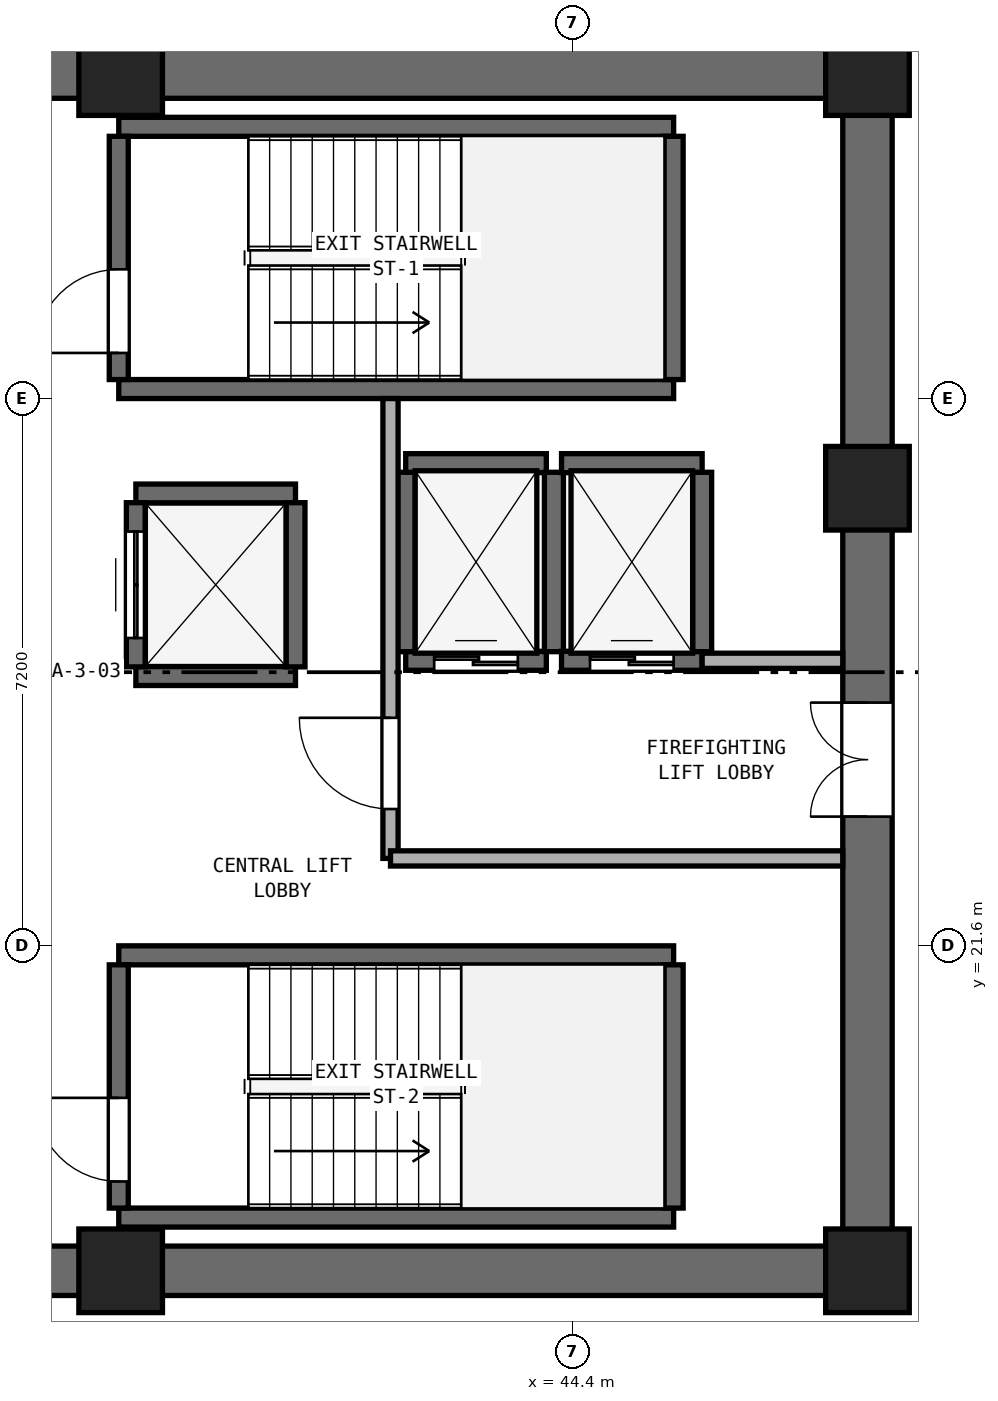
"""IFC4 building model, lengths in metres.
Left out: names, types, materials, properties, quantities, classifications, styles, units other than length and angle.
Written with IfcOpenShell. Run it as: python <this file> out.ifc"""

import sys

from ifc_helpers import new_model, si_unit, direction, frame, frame_2d, origin, origin_2d, place, context, subcontext, project, spatial, rectangle, extrude, element, fill, save


model = new_model("IFC4")
c1 = context("Model", 3, precision=1e-05, world=origin(), true_north=direction((0.0, 1.0)))
c2 = subcontext(c1, "Body", "Model", "MODEL_VIEW")
j1 = project(units=[si_unit("LENGTHUNIT", "METRE"), si_unit("PLANEANGLEUNIT", "RADIAN")], contexts=[c1])
p1 = place(None, origin())
s1 = spatial("IfcSite", under=j1, at=p1, CompositionType="ELEMENT")
p2 = place(p1, origin())
s2 = spatial("IfcBuilding", under=s1, at=p2, CompositionType="ELEMENT")
p3 = place(p2, frame((0.0, 0.0, 89.6)))
s3 = spatial("IfcBuildingStorey", under=s2, at=p3, CompositionType="ELEMENT", Elevation=89.6)
for number, where, z_axis, x_axis in (
    (1, (25.4, 17.325, 0.0), (0.0, 0.0, 1.0), (1.0, 0.0, 0.0)),
    (2, (25.4, 33.075, 0.0), (0.0, 0.0, 1.0), (1.0, 0.0, 0.0)),
):
    element("IfcWall", number, at=place(p3, frame(where, z_axis=z_axis, x_axis=x_axis)), inside=s3, PredefinedType="SHEAR", context=c2, shape_type="SweptSolid", body=[
        extrude(rectangle(XDim=23.2, YDim=0.65, at=frame_2d((11.6, 0.0))), origin(), (0.0, 0.0, 1.0), 3.525),
    ])
p4 = place(p3, frame((48.275, 17.65, 0.0), z_axis=(0.0, 0.0, 1.0), x_axis=(0.0, 1.0, 0.0)))
e3 = element("IfcWall", 3, at=p4, inside=s3, PredefinedType="SHEAR", context=c2, shape_type="SweptSolid", body=[
    extrude(rectangle(XDim=15.1, YDim=0.65, at=frame_2d((7.55, 0.0))), origin(), (0.0, 0.0, 1.0), 3.525),
])
p5 = place(p4, frame((5.65, 0.0, 0.0)))
e4 = element("IfcOpeningElement", 4, at=p5, cuts=e3, PredefinedType="OPENING", context=c2, shape_type="SweptSolid", body=[
    extrude(rectangle(XDim=1.5, YDim=2.15, at=frame_2d((0.75, 1.075))), frame((0.0, 0.335, 0.0), z_axis=(0.0, -1.0, 0.0), x_axis=(1.0, 0.0, 0.0)), (0.0, 0.0, 1.0), 0.67),
])
for number, where, z_axis, x_axis in (
    (5, (38.45, 17.325, 0.0), (0.0, 0.0, 1.0), (1.0, 0.0, 0.0)),
    (6, (48.275, 17.325, 0.0), (0.0, 0.0, 1.0), (1.0, 0.0, 0.0)),
    (7, (48.275, 27.62, 0.0), (0.0, 0.0, 1.0), (1.0, 0.0, 0.0)),
    (8, (48.275, 33.075, 0.0), (0.0, 0.0, 1.0), (1.0, 0.0, 0.0)),
    (9, (38.45, 33.075, 0.0), (0.0, 0.0, 1.0), (1.0, 0.0, 0.0)),
):
    element("IfcColumn", number, at=place(p3, frame(where, z_axis=z_axis, x_axis=x_axis)), inside=s3, PredefinedType="PILASTER", context=c2, shape_type="SweptSolid", body=[
        extrude(rectangle(XDim=1.1, YDim=1.1, at=origin_2d()), origin(), (0.0, 0.0, 1.0), 3.8),
    ])
for number, where, z_axis, x_axis in (
    (10, (38.425, 28.925, 0.0), (0.0, 0.0, 1.0), (1.0, 0.0, 0.0)),
    (11, (38.425, 32.375, 0.0), (0.0, 0.0, 1.0), (1.0, 0.0, 0.0)),
):
    element("IfcWall", number, at=place(p3, frame(where, z_axis=z_axis, x_axis=x_axis)), inside=s3, PredefinedType="SHEAR", context=c2, shape_type="SweptSolid", body=[
        extrude(rectangle(XDim=7.3, YDim=0.25, at=frame_2d((3.65, 0.0))), origin(), (0.0, 0.0, 1.0), 3.525),
    ])
p6 = place(p3, frame((38.425, 29.05, 0.0), z_axis=(0.0, 0.0, 1.0), x_axis=(0.0, 1.0, 0.0)))
e12 = element("IfcWall", 12, at=p6, inside=s3, PredefinedType="SHEAR", context=c2, shape_type="SweptSolid", body=[
    extrude(rectangle(XDim=3.2, YDim=0.25, at=frame_2d((1.6, 0.0))), origin(), (0.0, 0.0, 1.0), 3.525),
])
p7 = place(p6, frame((0.35, 0.0, 0.0)))
e13 = element("IfcOpeningElement", 13, at=p7, cuts=e12, PredefinedType="OPENING", context=c2, shape_type="SweptSolid", body=[
    extrude(rectangle(XDim=1.1, YDim=2.15, at=frame_2d((0.55, 1.075))), frame((0.0, 0.135, 0.0), z_axis=(0.0, -1.0, 0.0), x_axis=(1.0, 0.0, 0.0)), (0.0, 0.0, 1.0), 0.27),
])
p8 = place(p3, frame((45.725, 29.05, 0.0), z_axis=(0.0, 0.0, 1.0), x_axis=(0.0, 1.0, 0.0)))
e14 = element("IfcWall", 14, at=p8, inside=s3, PredefinedType="SHEAR", context=c2, shape_type="SweptSolid", body=[
    extrude(rectangle(XDim=3.2, YDim=0.25, at=frame_2d((1.6, 0.0))), origin(), (0.0, 0.0, 1.0), 3.525),
])
for number, where, z_axis, x_axis in (
    (15, (38.425, 18.025, 0.0), (0.0, 0.0, 1.0), (1.0, 0.0, 0.0)),
    (16, (38.425, 21.475, 0.0), (0.0, 0.0, 1.0), (1.0, 0.0, 0.0)),
):
    element("IfcWall", number, at=place(p3, frame(where, z_axis=z_axis, x_axis=x_axis)), inside=s3, PredefinedType="SHEAR", context=c2, shape_type="SweptSolid", body=[
        extrude(rectangle(XDim=7.3, YDim=0.25, at=frame_2d((3.65, 0.0))), origin(), (0.0, 0.0, 1.0), 3.525),
    ])
p9 = place(p3, frame((38.425, 18.15, 0.0), z_axis=(0.0, 0.0, 1.0), x_axis=(0.0, 1.0, 0.0)))
e17 = element("IfcWall", 17, at=p9, inside=s3, PredefinedType="SHEAR", context=c2, shape_type="SweptSolid", body=[
    extrude(rectangle(XDim=3.2, YDim=0.25, at=frame_2d((1.6, 0.0))), origin(), (0.0, 0.0, 1.0), 3.525),
])
p10 = place(p9, frame((0.35, 0.0, 0.0)))
e18 = element("IfcOpeningElement", 18, at=p10, cuts=e17, PredefinedType="OPENING", context=c2, shape_type="SweptSolid", body=[
    extrude(rectangle(XDim=1.1, YDim=2.15, at=frame_2d((0.55, 1.075))), frame((0.0, 0.135, 0.0), z_axis=(0.0, -1.0, 0.0), x_axis=(1.0, 0.0, 0.0)), (0.0, 0.0, 1.0), 0.27),
])
p11 = place(p3, frame((45.725, 18.15, 0.0), z_axis=(0.0, 0.0, 1.0), x_axis=(0.0, 1.0, 0.0)))
e19 = element("IfcWall", 19, at=p11, inside=s3, PredefinedType="SHEAR", context=c2, shape_type="SweptSolid", body=[
    extrude(rectangle(XDim=3.2, YDim=0.25, at=frame_2d((1.6, 0.0))), origin(), (0.0, 0.0, 1.0), 3.525),
])
p12 = place(p3, frame((42.2, 25.35, 0.0), z_axis=(0.0, 0.0, 1.0), x_axis=(1.0, 0.0, 0.0)))
e20 = element("IfcWall", 20, at=p12, inside=s3, PredefinedType="SHEAR", context=c2, shape_type="SweptSolid", body=[
    extrude(rectangle(XDim=1.85, YDim=0.25, at=frame_2d((0.925, 0.0))), origin(), (0.0, 0.0, 1.0), 3.525),
])
p13 = place(p12, frame((0.375, 0.0, 0.0)))
e21 = element("IfcOpeningElement", 21, at=p13, cuts=e20, PredefinedType="OPENING", context=c2, shape_type="SweptSolid", body=[
    extrude(rectangle(XDim=1.1, YDim=2.15, at=frame_2d((0.55, 1.075))), frame((0.0, 0.135, 0.0), z_axis=(0.0, -1.0, 0.0), x_axis=(1.0, 0.0, 0.0)), (0.0, 0.0, 1.0), 0.27),
])
p14 = place(p3, frame((42.2, 27.95, 0.0), z_axis=(0.0, 0.0, 1.0), x_axis=(1.0, 0.0, 0.0)))
e22 = element("IfcWall", 22, at=p14, inside=s3, PredefinedType="SHEAR", context=c2, shape_type="SweptSolid", body=[
    extrude(rectangle(XDim=1.85, YDim=0.25, at=frame_2d((0.925, 0.0))), origin(), (0.0, 0.0, 1.0), 3.525),
])
for number, where, z_axis, x_axis in (
    (23, (42.2, 25.47, 0.0), (0.0, 0.0, 1.0), (0.0, 1.0, 0.0)),
    (24, (44.15, 25.47, 0.0), (0.0, 0.0, 1.0), (0.0, 1.0, 0.0)),
):
    element("IfcWall", number, at=place(p3, frame(where, z_axis=z_axis, x_axis=x_axis)), inside=s3, PredefinedType="SHEAR", context=c2, shape_type="SweptSolid", body=[
        extrude(rectangle(XDim=2.36, YDim=0.25, at=frame_2d((1.18, 0.0))), origin(), (0.0, 0.0, 1.0), 3.525),
    ])
p15 = place(p3, frame((44.25, 25.35, 0.0), z_axis=(0.0, 0.0, 1.0), x_axis=(1.0, 0.0, 0.0)))
e25 = element("IfcWall", 25, at=p15, inside=s3, PredefinedType="SHEAR", context=c2, shape_type="SweptSolid", body=[
    extrude(rectangle(XDim=1.85, YDim=0.25, at=frame_2d((0.925, 0.0))), origin(), (0.0, 0.0, 1.0), 3.525),
])
p16 = place(p15, frame((0.375, 0.0, 0.0)))
e26 = element("IfcOpeningElement", 26, at=p16, cuts=e25, PredefinedType="OPENING", context=c2, shape_type="SweptSolid", body=[
    extrude(rectangle(XDim=1.1, YDim=2.15, at=frame_2d((0.55, 1.075))), frame((0.0, 0.135, 0.0), z_axis=(0.0, -1.0, 0.0), x_axis=(1.0, 0.0, 0.0)), (0.0, 0.0, 1.0), 0.27),
])
p17 = place(p3, frame((44.25, 27.95, 0.0), z_axis=(0.0, 0.0, 1.0), x_axis=(1.0, 0.0, 0.0)))
e27 = element("IfcWall", 27, at=p17, inside=s3, PredefinedType="SHEAR", context=c2, shape_type="SweptSolid", body=[
    extrude(rectangle(XDim=1.85, YDim=0.25, at=frame_2d((0.925, 0.0))), origin(), (0.0, 0.0, 1.0), 3.525),
])
p18 = place(p3, frame((46.1, 25.47, 0.0), z_axis=(0.0, 0.0, 1.0), x_axis=(0.0, 1.0, 0.0)))
e28 = element("IfcWall", 28, at=p18, inside=s3, PredefinedType="SHEAR", context=c2, shape_type="SweptSolid", body=[
    extrude(rectangle(XDim=2.36, YDim=0.25, at=frame_2d((1.18, 0.0))), origin(), (0.0, 0.0, 1.0), 3.525),
])
for number, where, z_axis, x_axis in (
    (29, (38.65, 25.15, 0.0), (0.0, 0.0, 1.0), (1.0, 0.0, 0.0)),
    (30, (38.65, 27.55, 0.0), (0.0, 0.0, 1.0), (1.0, 0.0, 0.0)),
):
    element("IfcWall", number, at=place(p3, frame(where, z_axis=z_axis, x_axis=x_axis)), inside=s3, PredefinedType="SHEAR", context=c2, shape_type="SweptSolid", body=[
        extrude(rectangle(XDim=2.1, YDim=0.25, at=frame_2d((1.05, 0.0))), origin(), (0.0, 0.0, 1.0), 3.525),
    ])
p19 = place(p3, frame((38.65, 25.27, 0.0), z_axis=(0.0, 0.0, 1.0), x_axis=(0.0, 1.0, 0.0)))
e31 = element("IfcWall", 31, at=p19, inside=s3, PredefinedType="SHEAR", context=c2, shape_type="SweptSolid", body=[
    extrude(rectangle(XDim=2.16, YDim=0.25, at=frame_2d((1.08, 0.0))), origin(), (0.0, 0.0, 1.0), 3.525),
])
p20 = place(p19, frame((0.38, 0.0, 0.0)))
e32 = element("IfcOpeningElement", 32, at=p20, cuts=e31, PredefinedType="OPENING", context=c2, shape_type="SweptSolid", body=[
    extrude(rectangle(XDim=1.4, YDim=2.2, at=frame_2d((0.7, 1.1))), frame((0.0, 0.135, 0.0), z_axis=(0.0, -1.0, 0.0), x_axis=(1.0, 0.0, 0.0)), (0.0, 0.0, 1.0), 0.27),
])
p21 = place(p3, frame((40.75, 25.27, 0.0), z_axis=(0.0, 0.0, 1.0), x_axis=(0.0, 1.0, 0.0)))
e33 = element("IfcWall", 33, at=p21, inside=s3, PredefinedType="SHEAR", context=c2, shape_type="SweptSolid", body=[
    extrude(rectangle(XDim=2.16, YDim=0.25, at=frame_2d((1.08, 0.0))), origin(), (0.0, 0.0, 1.0), 3.525),
])
p22 = place(p3, frame((42.0, 22.75, 0.0), z_axis=(0.0, 0.0, 1.0), x_axis=(0.0, 1.0, 0.0)))
e34 = element("IfcWall", 34, at=p22, inside=s3, PredefinedType="SOLIDWALL", context=c2, shape_type="SweptSolid", body=[
    extrude(rectangle(XDim=6.05, YDim=0.2, at=frame_2d((3.025, 0.0))), origin(), (0.0, 0.0, 1.0), 3.525),
])
p23 = place(p22, frame((0.65, 0.0, 0.0)))
e35 = element("IfcOpeningElement", 35, at=p23, cuts=e34, PredefinedType="OPENING", context=c2, shape_type="SweptSolid", body=[
    extrude(rectangle(XDim=1.2, YDim=2.15, at=frame_2d((0.6, 1.075))), frame((0.0, 0.11, 0.0), z_axis=(0.0, -1.0, 0.0), x_axis=(1.0, 0.0, 0.0)), (0.0, 0.0, 1.0), 0.22),
])
p24 = place(p3, frame((42.0, 22.75, 0.0), z_axis=(0.0, 0.0, 1.0), x_axis=(1.0, 0.0, 0.0)))
e36 = element("IfcWall", 36, at=p24, inside=s3, PredefinedType="SOLIDWALL", context=c2, shape_type="SweptSolid", body=[
    extrude(rectangle(XDim=5.95, YDim=0.2, at=frame_2d((2.975, 0.0))), origin(), (0.0, 0.0, 1.0), 3.525),
])
p25 = place(p3, frame((46.1, 25.35, 0.0), z_axis=(0.0, 0.0, 1.0), x_axis=(1.0, 0.0, 0.0)))
e37 = element("IfcWall", 37, at=p25, inside=s3, PredefinedType="SOLIDWALL", context=c2, shape_type="SweptSolid", body=[
    extrude(rectangle(XDim=1.85, YDim=0.2, at=frame_2d((0.925, 0.0))), origin(), (0.0, 0.0, 1.0), 3.525),
])
p26 = place(p7, origin())
e38 = element("IfcDoor", 38, at=p26, inside=s3, OperationType="SINGLE_SWING_LEFT", PredefinedType="DOOR", context=c2, shape_type="SweptSolid", body=[
    extrude(rectangle(XDim=1.1, YDim=2.15, at=frame_2d((0.55, 1.075))), frame((0.0, 0.025, 0.0), z_axis=(0.0, -1.0, 0.0), x_axis=(1.0, 0.0, 0.0)), (0.0, 0.0, 1.0), 0.05),
])
fill(e13, e38)
p27 = place(p10, origin())
e39 = element("IfcDoor", 39, at=p27, inside=s3, OperationType="SINGLE_SWING_RIGHT", PredefinedType="DOOR", context=c2, shape_type="SweptSolid", body=[
    extrude(rectangle(XDim=1.1, YDim=2.15, at=frame_2d((0.55, 1.075))), frame((0.0, 0.025, 0.0), z_axis=(0.0, -1.0, 0.0), x_axis=(1.0, 0.0, 0.0)), (0.0, 0.0, 1.0), 0.05),
])
fill(e18, e39)
p28 = place(p13, origin())
e40 = element("IfcDoor", 40, at=p28, inside=s3, OperationType="DOUBLE_DOOR_SLIDING", PredefinedType="DOOR", context=c2, shape_type="SweptSolid", body=[
    extrude(rectangle(XDim=1.1, YDim=2.15, at=frame_2d((0.55, 1.075))), frame((0.0, 0.025, 0.0), z_axis=(0.0, -1.0, 0.0), x_axis=(1.0, 0.0, 0.0)), (0.0, 0.0, 1.0), 0.05),
])
fill(e21, e40)
p29 = place(p16, origin())
e41 = element("IfcDoor", 41, at=p29, inside=s3, OperationType="DOUBLE_DOOR_SLIDING", PredefinedType="DOOR", context=c2, shape_type="SweptSolid", body=[
    extrude(rectangle(XDim=1.1, YDim=2.15, at=frame_2d((0.55, 1.075))), frame((0.0, 0.025, 0.0), z_axis=(0.0, -1.0, 0.0), x_axis=(1.0, 0.0, 0.0)), (0.0, 0.0, 1.0), 0.05),
])
fill(e26, e41)
p30 = place(p20, origin())
e42 = element("IfcDoor", 42, at=p30, inside=s3, OperationType="DOUBLE_DOOR_SLIDING", PredefinedType="DOOR", context=c2, shape_type="SweptSolid", body=[
    extrude(rectangle(XDim=1.4, YDim=2.2, at=frame_2d((0.7, 1.1))), frame((0.0, 0.025, 0.0), z_axis=(0.0, -1.0, 0.0), x_axis=(1.0, 0.0, 0.0)), (0.0, 0.0, 1.0), 0.05),
])
fill(e32, e42)
p31 = place(p23, origin())
e43 = element("IfcDoor", 43, at=p31, inside=s3, OperationType="SINGLE_SWING_RIGHT", PredefinedType="DOOR", context=c2, shape_type="SweptSolid", body=[
    extrude(rectangle(XDim=1.2, YDim=2.15, at=frame_2d((0.6, 1.075))), frame((0.0, 0.025, 0.0), z_axis=(0.0, -1.0, 0.0), x_axis=(1.0, 0.0, 0.0)), (0.0, 0.0, 1.0), 0.05),
])
fill(e35, e43)
p32 = place(p5, origin())
e44 = element("IfcDoor", 44, at=p32, inside=s3, OperationType="DOUBLE_DOOR_SINGLE_SWING", PredefinedType="DOOR", context=c2, shape_type="SweptSolid", body=[
    extrude(rectangle(XDim=1.5, YDim=2.15, at=frame_2d((0.75, 1.075))), frame((0.0, 0.025, 0.0), z_axis=(0.0, -1.0, 0.0), x_axis=(1.0, 0.0, 0.0)), (0.0, 0.0, 1.0), 0.05),
])
fill(e4, e44)
save(model, sys.argv[1])
